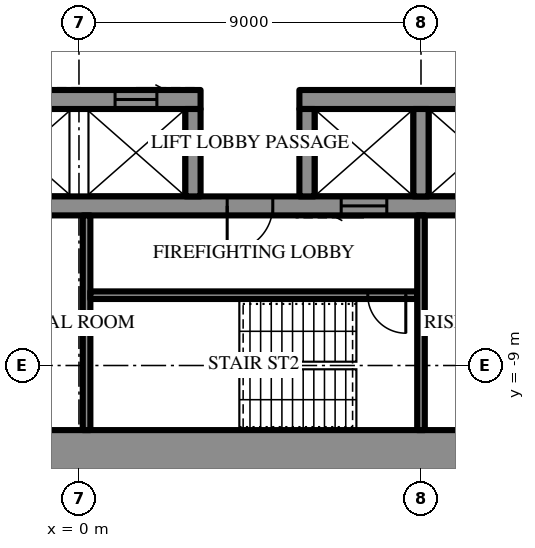
"""IFC4 building model, lengths in metres.
Left out: names, types, materials, properties, quantities, classifications, styles, units other than length and angle.
Written with IfcOpenShell. Run it as: python <this file> out.ifc"""

import sys

from ifc_helpers import new_model, si_unit, direction, frame, frame_2d, origin, place, context, subcontext, project, spatial, rectangle, extrude, element, fill, save


model = new_model("IFC4")
c1 = context("Model", 3, precision=1e-05, world=origin(), true_north=direction((0.0, 1.0)))
c2 = subcontext(c1, "Body", "Model", "MODEL_VIEW")
j1 = project(units=[si_unit("LENGTHUNIT", "METRE"), si_unit("PLANEANGLEUNIT", "RADIAN")], contexts=[c1])
p1 = place(None, origin())
s1 = spatial("IfcSite", under=j1, at=p1, CompositionType="ELEMENT")
p2 = place(p1, origin())
s2 = spatial("IfcBuilding", under=s1, at=p2, CompositionType="ELEMENT")
p3 = place(p2, frame((0.0, 0.0, 274.3)))
s3 = spatial("IfcBuildingStorey", under=s2, at=p3, CompositionType="ELEMENT", Elevation=274.3)
p4 = place(p3, frame((15.5, -11.5, 0.0), z_axis=(0.0, 0.0, 1.0), x_axis=(-1.0, 0.0, 0.0)))
e1 = element("IfcWall", 1, at=p4, inside=s3, PredefinedType="SHEAR", context=c2, shape_type="SweptSolid", body=[
    extrude(rectangle(XDim=31.0, YDim=1.6, at=frame_2d((15.5, 0.0))), origin(), (0.0, 0.0, 1.0), 4.2),
])
p5 = place(p4, frame((16.35, 0.0, 0.0)))
e2 = element("IfcOpeningElement", 2, at=p5, cuts=e1, PredefinedType="OPENING", context=c2, shape_type="SweptSolid", body=[
    extrude(rectangle(XDim=0.9, YDim=2.2, at=frame_2d((0.45, 1.1))), frame((0.0, 0.81, 0.0), z_axis=(0.0, -1.0, 0.0), x_axis=(1.0, 0.0, 0.0)), (0.0, 0.0, 1.0), 1.62),
])
p6 = place(p4, frame((19.35, 0.0, 0.0)))
e3 = element("IfcOpeningElement", 3, at=p6, cuts=e1, PredefinedType="OPENING", context=c2, shape_type="SweptSolid", body=[
    extrude(rectangle(XDim=0.9, YDim=2.2, at=frame_2d((0.45, 1.1))), frame((0.0, 0.81, 0.0), z_axis=(0.0, -1.0, 0.0), x_axis=(1.0, 0.0, 0.0)), (0.0, 0.0, 1.0), 1.62),
])
p7 = place(p4, frame((22.4, 0.0, 0.0)))
e4 = element("IfcOpeningElement", 4, at=p7, cuts=e1, PredefinedType="OPENING", context=c2, shape_type="SweptSolid", body=[
    extrude(rectangle(XDim=1.0, YDim=2.2, at=frame_2d((0.5, 1.1))), frame((0.0, 0.81, 0.0), z_axis=(0.0, -1.0, 0.0), x_axis=(1.0, 0.0, 0.0)), (0.0, 0.0, 1.0), 1.62),
])
p8 = place(p4, frame((1.65, 0.0, 0.0)))
e5 = element("IfcOpeningElement", 5, at=p8, cuts=e1, PredefinedType="OPENING", context=c2, shape_type="SweptSolid", body=[
    extrude(rectangle(XDim=0.9, YDim=2.2, at=frame_2d((0.45, 1.1))), frame((0.0, 0.81, 0.0), z_axis=(0.0, -1.0, 0.0), x_axis=(1.0, 0.0, 0.0)), (0.0, 0.0, 1.0), 1.62),
])
p9 = place(p4, frame((4.65, 0.0, 0.0)))
e6 = element("IfcOpeningElement", 6, at=p9, cuts=e1, PredefinedType="OPENING", context=c2, shape_type="SweptSolid", body=[
    extrude(rectangle(XDim=0.9, YDim=2.2, at=frame_2d((0.45, 1.1))), frame((0.0, 0.81, 0.0), z_axis=(0.0, -1.0, 0.0), x_axis=(1.0, 0.0, 0.0)), (0.0, 0.0, 1.0), 1.62),
])
p10 = place(p4, frame((25.45, 0.0, 0.0)))
e7 = element("IfcOpeningElement", 7, at=p10, cuts=e1, PredefinedType="OPENING", context=c2, shape_type="SweptSolid", body=[
    extrude(rectangle(XDim=0.9, YDim=2.2, at=frame_2d((0.45, 1.1))), frame((0.0, 0.81, 0.0), z_axis=(0.0, -1.0, 0.0), x_axis=(1.0, 0.0, 0.0)), (0.0, 0.0, 1.0), 1.62),
])
p11 = place(p4, frame((28.45, 0.0, 0.0)))
e8 = element("IfcOpeningElement", 8, at=p11, cuts=e1, PredefinedType="OPENING", context=c2, shape_type="SweptSolid", body=[
    extrude(rectangle(XDim=0.9, YDim=2.2, at=frame_2d((0.45, 1.1))), frame((0.0, 0.81, 0.0), z_axis=(0.0, -1.0, 0.0), x_axis=(1.0, 0.0, 0.0)), (0.0, 0.0, 1.0), 1.62),
])
p12 = place(p3, frame((11.7, -2.0, 0.0), z_axis=(0.0, 0.0, 1.0), x_axis=(-1.0, 0.0, 0.0)))
e9 = element("IfcWall", 9, at=p12, inside=s3, PredefinedType="SHEAR", context=c2, shape_type="SweptSolid", body=[
    extrude(rectangle(XDim=5.9, YDim=0.5, at=frame_2d((2.95, 0.0))), origin(), (0.0, 0.0, 1.0), 4.2),
])
p13 = place(p3, frame((3.2, -2.0, 0.0), z_axis=(0.0, 0.0, 1.0), x_axis=(-1.0, 0.0, 0.0)))
e10 = element("IfcWall", 10, at=p13, inside=s3, PredefinedType="SHEAR", context=c2, shape_type="SweptSolid", body=[
    extrude(rectangle(XDim=14.9, YDim=0.5, at=frame_2d((7.45, 0.0))), origin(), (0.0, 0.0, 1.0), 4.2),
])
p14 = place(p13, frame((1.15, 0.0, 0.0)))
e11 = element("IfcOpeningElement", 11, at=p14, cuts=e10, PredefinedType="OPENING", context=c2, shape_type="SweptSolid", body=[
    extrude(rectangle(XDim=1.1, YDim=2.2, at=frame_2d((0.55, 1.1))), frame((0.0, 0.26, 0.0), z_axis=(0.0, -1.0, 0.0), x_axis=(1.0, 0.0, 0.0)), (0.0, 0.0, 1.0), 0.52),
])
p15 = place(p13, frame((4.15, 0.0, 0.0)))
e12 = element("IfcOpeningElement", 12, at=p15, cuts=e10, PredefinedType="OPENING", context=c2, shape_type="SweptSolid", body=[
    extrude(rectangle(XDim=1.1, YDim=2.2, at=frame_2d((0.55, 1.1))), frame((0.0, 0.26, 0.0), z_axis=(0.0, -1.0, 0.0), x_axis=(1.0, 0.0, 0.0)), (0.0, 0.0, 1.0), 0.52),
])
p16 = place(p13, frame((7.15, 0.0, 0.0)))
e13 = element("IfcOpeningElement", 13, at=p16, cuts=e10, PredefinedType="OPENING", context=c2, shape_type="SweptSolid", body=[
    extrude(rectangle(XDim=1.1, YDim=2.2, at=frame_2d((0.55, 1.1))), frame((0.0, 0.26, 0.0), z_axis=(0.0, -1.0, 0.0), x_axis=(1.0, 0.0, 0.0)), (0.0, 0.0, 1.0), 0.52),
])
p17 = place(p13, frame((10.15, 0.0, 0.0)))
e14 = element("IfcOpeningElement", 14, at=p17, cuts=e10, PredefinedType="OPENING", context=c2, shape_type="SweptSolid", body=[
    extrude(rectangle(XDim=1.1, YDim=2.2, at=frame_2d((0.55, 1.1))), frame((0.0, 0.26, 0.0), z_axis=(0.0, -1.0, 0.0), x_axis=(1.0, 0.0, 0.0)), (0.0, 0.0, 1.0), 0.52),
])
p18 = place(p3, frame((11.7, -4.8, 0.0), z_axis=(0.0, 0.0, 1.0), x_axis=(-1.0, 0.0, 0.0)))
e15 = element("IfcWall", 15, at=p18, inside=s3, PredefinedType="SHEAR", context=c2, shape_type="SweptSolid", body=[
    extrude(rectangle(XDim=23.4, YDim=0.5, at=frame_2d((11.7, 0.0))), origin(), (0.0, 0.0, 1.0), 4.2),
])
p19 = place(p18, frame((6.6, 0.0, 0.0)))
e16 = element("IfcOpeningElement", 16, at=p19, cuts=e15, PredefinedType="OPENING", context=c2, shape_type="SweptSolid", body=[
    extrude(rectangle(XDim=1.2, YDim=2.2, at=frame_2d((0.6, 1.1))), frame((0.0, 0.26, 0.0), z_axis=(0.0, -1.0, 0.0), x_axis=(1.0, 0.0, 0.0)), (0.0, 0.0, 1.0), 0.52),
])
p20 = place(p18, frame((3.6, 0.0, 0.0)))
e17 = element("IfcOpeningElement", 17, at=p20, cuts=e15, PredefinedType="OPENING", context=c2, shape_type="SweptSolid", body=[
    extrude(rectangle(XDim=1.2, YDim=2.2, at=frame_2d((0.6, 1.1))), frame((0.0, 0.26, 0.0), z_axis=(0.0, -1.0, 0.0), x_axis=(1.0, 0.0, 0.0)), (0.0, 0.0, 1.0), 0.52),
])
for number, where, z_axis, x_axis in (
    (18, (9.0, -2.25, 0.0), (0.0, 0.0, 1.0), (0.0, -1.0, 0.0)),
    (19, (6.0, -2.25, 0.0), (0.0, 0.0, 1.0), (0.0, -1.0, 0.0)),
    (20, (3.0, -2.25, 0.0), (0.0, 0.0, 1.0), (0.0, -1.0, 0.0)),
):
    element("IfcWall", number, at=place(p3, frame(where, z_axis=z_axis, x_axis=x_axis)), inside=s3, PredefinedType="SHEAR", context=c2, shape_type="SweptSolid", body=[
        extrude(rectangle(XDim=2.3, YDim=0.4, at=frame_2d((1.15, 0.0))), origin(), (0.0, 0.0, 1.0), 4.2),
    ])
p21 = place(p3, frame((0.2, -5.05, 0.0), z_axis=(0.0, 0.0, 1.0), x_axis=(0.0, -1.0, 0.0)))
e21 = element("IfcWall", 21, at=p21, inside=s3, PredefinedType="SHEAR", context=c2, shape_type="SweptSolid", body=[
    extrude(rectangle(XDim=5.65, YDim=0.2, at=frame_2d((2.825, 0.0))), origin(), (0.0, 0.0, 1.0), 4.2),
])
p22 = place(p3, frame((8.9, -7.15, 0.0), z_axis=(0.0, 0.0, 1.0), x_axis=(-1.0, 0.0, 0.0)))
e22 = element("IfcWall", 22, at=p22, inside=s3, PredefinedType="SHEAR", context=c2, shape_type="SweptSolid", body=[
    extrude(rectangle(XDim=8.6, YDim=0.2, at=frame_2d((4.3, 0.0))), origin(), (0.0, 0.0, 1.0), 4.2),
])
p23 = place(p22, frame((0.3, 0.0, 0.0)))
e23 = element("IfcOpeningElement", 23, at=p23, cuts=e22, PredefinedType="OPENING", context=c2, shape_type="SweptSolid", body=[
    extrude(rectangle(XDim=1.0, YDim=2.2, at=frame_2d((0.5, 1.1))), frame((0.0, 0.11, 0.0), z_axis=(0.0, -1.0, 0.0), x_axis=(1.0, 0.0, 0.0)), (0.0, 0.0, 1.0), 0.22),
])
p24 = place(p3, frame((9.0, -5.05, 0.0), z_axis=(0.0, 0.0, 1.0), x_axis=(0.0, -1.0, 0.0)))
e24 = element("IfcWall", 24, at=p24, inside=s3, PredefinedType="PARTITIONING", context=c2, shape_type="SweptSolid", body=[
    extrude(rectangle(XDim=5.65, YDim=0.2, at=frame_2d((2.825, 0.0))), origin(), (0.0, 0.0, 1.0), 4.0),
])
p25 = place(p19, origin())
e25 = element("IfcDoor", 25, at=p25, inside=s3, OperationType="SINGLE_SWING_LEFT", PredefinedType="DOOR", context=c2, shape_type="SweptSolid", body=[
    extrude(rectangle(XDim=1.2, YDim=2.2, at=frame_2d((0.6, 1.1))), frame((0.0, 0.025, 0.0), z_axis=(0.0, -1.0, 0.0), x_axis=(1.0, 0.0, 0.0)), (0.0, 0.0, 1.0), 0.05),
])
fill(e16, e25)
p26 = place(p23, origin())
e26 = element("IfcDoor", 26, at=p26, inside=s3, OperationType="SINGLE_SWING_RIGHT", PredefinedType="DOOR", context=c2, shape_type="SweptSolid", body=[
    extrude(rectangle(XDim=1.0, YDim=2.2, at=frame_2d((0.5, 1.1))), frame((0.0, 0.025, 0.0), z_axis=(0.0, -1.0, 0.0), x_axis=(1.0, 0.0, 0.0)), (0.0, 0.0, 1.0), 0.05),
])
fill(e23, e26)
p27 = place(p20, origin())
e27 = element("IfcDoor", 27, at=p27, inside=s3, OperationType="SLIDING_TO_LEFT", PredefinedType="DOOR", context=c2, shape_type="SweptSolid", body=[
    extrude(rectangle(XDim=1.2, YDim=2.2, at=frame_2d((0.6, 1.1))), frame((0.0, 0.025, 0.0), z_axis=(0.0, -1.0, 0.0), x_axis=(1.0, 0.0, 0.0)), (0.0, 0.0, 1.0), 0.05),
])
fill(e17, e27)
p28 = place(p14, frame((1.1, 0.0, 0.0), z_axis=(0.0, 0.0, 1.0), x_axis=(-1.0, 0.0, 0.0)))
e28 = element("IfcDoor", 28, at=p28, inside=s3, OperationType="SLIDING_TO_LEFT", PredefinedType="DOOR", context=c2, shape_type="SweptSolid", body=[
    extrude(rectangle(XDim=1.1, YDim=2.2, at=frame_2d((0.55, 1.1))), frame((0.0, 0.025, 0.0), z_axis=(0.0, -1.0, 0.0), x_axis=(1.0, 0.0, 0.0)), (0.0, 0.0, 1.0), 0.05),
])
fill(e11, e28)
save(model, sys.argv[1])
